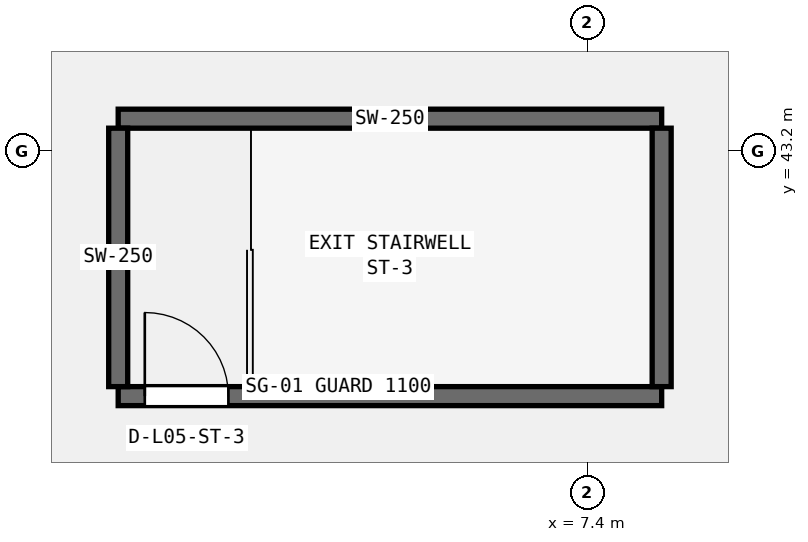
"""IFC4 building model, lengths in metres.
Left out: names, types, materials, properties, quantities, classifications, styles, units other than length and angle.
Written with IfcOpenShell. Run it as: python <this file> out.ifc"""

import sys

from ifc_helpers import new_model, si_unit, direction, frame, frame_2d, origin, place, context, subcontext, project, spatial, rectangle, extrude, element, fill, save


model = new_model("IFC4")
c1 = context("Model", 3, precision=1e-05, world=origin(), true_north=direction((0.0, 1.0)))
c2 = subcontext(c1, "Body", "Model", "MODEL_VIEW")
j1 = project(units=[si_unit("LENGTHUNIT", "METRE"), si_unit("PLANEANGLEUNIT", "RADIAN")], contexts=[c1])
p1 = place(None, origin())
s1 = spatial("IfcSite", under=j1, at=p1, CompositionType="ELEMENT")
p2 = place(p1, origin())
s2 = spatial("IfcBuilding", under=s1, at=p2, CompositionType="ELEMENT")
p3 = place(p2, frame((0.0, 0.0, 25.0)))
s3 = spatial("IfcBuildingStorey", under=s2, at=p3, CompositionType="ELEMENT", Elevation=25.0)
p4 = place(p3, frame((1.225, 39.975, 0.0), z_axis=(0.0, 0.0, 1.0), x_axis=(1.0, 0.0, 0.0)))
e1 = element("IfcWall", 1, at=p4, inside=s3, PredefinedType="SHEAR", context=c2, shape_type="SweptSolid", body=[
    extrude(rectangle(XDim=7.15, YDim=0.25, at=frame_2d((3.575, 0.0))), origin(), (0.0, 0.0, 1.0), 3.525),
])
p5 = place(p4, frame((0.35, 0.0, 0.0)))
e2 = element("IfcOpeningElement", 2, at=p5, cuts=e1, PredefinedType="OPENING", context=c2, shape_type="SweptSolid", body=[
    extrude(rectangle(XDim=1.1, YDim=2.15, at=frame_2d((0.55, 1.075))), frame((0.0, 0.135, 0.0), z_axis=(0.0, -1.0, 0.0), x_axis=(1.0, 0.0, 0.0)), (0.0, 0.0, 1.0), 0.27),
])
p6 = place(p3, frame((1.225, 43.625, 0.0), z_axis=(0.0, 0.0, 1.0), x_axis=(1.0, 0.0, 0.0)))
e3 = element("IfcWall", 3, at=p6, inside=s3, PredefinedType="SHEAR", context=c2, shape_type="SweptSolid", body=[
    extrude(rectangle(XDim=7.15, YDim=0.25, at=frame_2d((3.575, 0.0))), origin(), (0.0, 0.0, 1.0), 3.525),
])
for number, where, z_axis, x_axis in (
    (4, (1.225, 40.1, 0.0), (0.0, 0.0, 1.0), (0.0, 1.0, 0.0)),
    (5, (8.375, 40.1, 0.0), (0.0, 0.0, 1.0), (0.0, 1.0, 0.0)),
):
    element("IfcWall", number, at=place(p3, frame(where, z_axis=z_axis, x_axis=x_axis)), inside=s3, PredefinedType="SHEAR", context=c2, shape_type="SweptSolid", body=[
        extrude(rectangle(XDim=3.4, YDim=0.25, at=frame_2d((1.7, 0.0))), origin(), (0.0, 0.0, 1.0), 3.525),
    ])
p7 = place(p5, origin())
e6 = element("IfcDoor", 6, at=p7, inside=s3, OperationType="SINGLE_SWING_LEFT", PredefinedType="DOOR", context=c2, shape_type="SweptSolid", body=[
    extrude(rectangle(XDim=1.1, YDim=2.15, at=frame_2d((0.55, 1.075))), frame((0.0, 0.025, 0.0), z_axis=(0.0, -1.0, 0.0), x_axis=(1.0, 0.0, 0.0)), (0.0, 0.0, 1.0), 0.05),
])
fill(e2, e6)
save(model, sys.argv[1])
